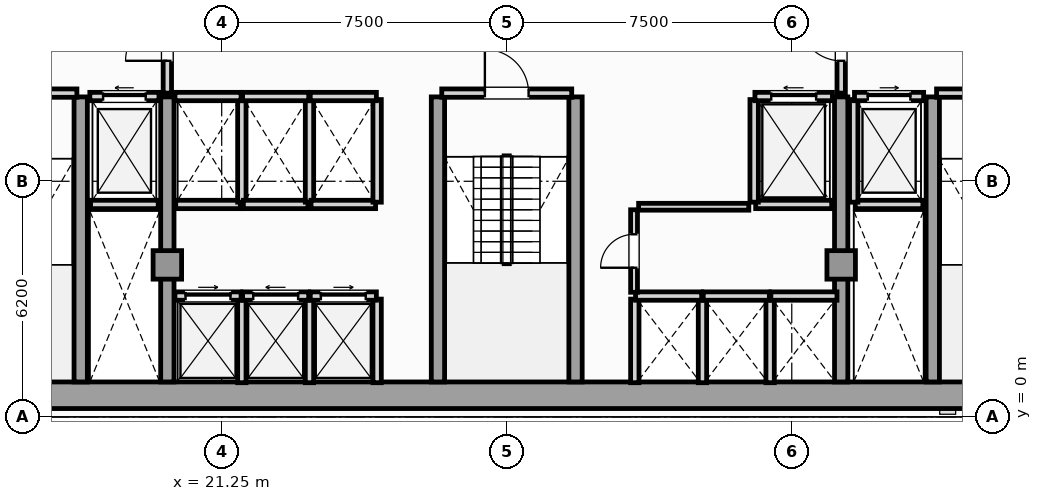
"""IFC4 building model, lengths in metres.
Left out: names, types, materials, properties, quantities, classifications, styles, units other than length and angle.
Written with IfcOpenShell. Run it as: python <this file> out.ifc"""

import sys

from ifc_helpers import new_model, si_unit, direction, frame, frame_2d, origin, origin_2d, place, context, subcontext, project, spatial, rectangle, extrude, element, fill, save


model = new_model("IFC4")
c1 = context("Model", 3, precision=1e-05, world=origin(), true_north=direction((0.0, 1.0)))
c2 = subcontext(c1, "Body", "Model", "MODEL_VIEW")
j1 = project(units=[si_unit("LENGTHUNIT", "METRE"), si_unit("PLANEANGLEUNIT", "RADIAN")], contexts=[c1])
p1 = place(None, origin())
s1 = spatial("IfcSite", under=j1, at=p1, CompositionType="ELEMENT")
p2 = place(p1, origin())
s2 = spatial("IfcBuilding", under=s1, at=p2, CompositionType="ELEMENT")
p3 = place(p2, frame((0.0, 0.0, 127.25)))
s3 = spatial("IfcBuildingStorey", under=s2, at=p3, CompositionType="ELEMENT", Elevation=127.25)
p4 = place(p3, frame((13.25, 0.57, 0.0), z_axis=(0.0, 0.0, 1.0), x_axis=(1.0, 0.0, 0.0)))
e1 = element("IfcWall", 1, at=p4, inside=s3, PredefinedType="SHEAR", context=c2, shape_type="SweptSolid", body=[
    extrude(rectangle(XDim=31.0, YDim=0.7, at=frame_2d((15.5, 0.0))), origin(), (0.0, 0.0, 1.0), 3.6),
])
for number, where, z_axis, x_axis in (
    (2, (17.54, 0.92, 0.0), (0.0, 0.0, 1.0), (0.0, 1.0, 0.0)),
    (3, (19.82, 0.92, 0.0), (0.0, 0.0, 1.0), (0.0, 1.0, 0.0)),
    (4, (26.94, 0.92, 0.0), (0.0, 0.0, 1.0), (0.0, 1.0, 0.0)),
    (5, (30.56, 0.92, 0.0), (0.0, 0.0, 1.0), (0.0, 1.0, 0.0)),
    (6, (37.55, 0.92, 0.0), (0.0, 0.0, 1.0), (0.0, 1.0, 0.0)),
    (7, (39.96, 0.92, 0.0), (0.0, 0.0, 1.0), (0.0, 1.0, 0.0)),
):
    element("IfcWall", number, at=place(p3, frame(where, z_axis=z_axis, x_axis=x_axis)), inside=s3, PredefinedType="SHEAR", context=c2, shape_type="SweptSolid", body=[
        extrude(rectangle(XDim=7.5, YDim=0.35, at=frame_2d((3.75, 0.0))), origin(), (0.0, 0.0, 1.0), 3.6),
    ])
for number, where, z_axis, x_axis in (
    (8, (19.82, 4.0, 0.0), (0.0, 0.0, 1.0), (1.0, 0.0, 0.0)),
    (9, (37.55, 4.0, 0.0), (0.0, 0.0, 1.0), (1.0, 0.0, 0.0)),
):
    element("IfcColumn", number, at=place(p3, frame(where, z_axis=z_axis, x_axis=x_axis)), inside=s3, PredefinedType="COLUMN", context=c2, shape_type="SweptSolid", body=[
        extrude(rectangle(XDim=0.75, YDim=0.75, at=origin_2d()), origin(), (0.0, 0.0, 1.0), 3.85),
    ])
p5 = place(p3, frame((17.8, 5.59, 0.0), z_axis=(0.0, 0.0, 1.0), x_axis=(1.0, 0.0, 0.0)))
e10 = element("IfcWall", 10, at=p5, inside=s3, PredefinedType="SOLIDWALL", context=c2, shape_type="SweptSolid", body=[
    extrude(rectangle(XDim=1.78, YDim=0.22, at=frame_2d((0.89, 0.0))), origin(), (0.0, 0.0, 1.0), 3.6),
])
p6 = place(p3, frame((17.78, 8.43, 0.0), z_axis=(0.0, 0.0, 1.0), x_axis=(1.0, 0.0, 0.0)))
e11 = element("IfcWall", 11, at=p6, inside=s3, PredefinedType="SOLIDWALL", context=c2, shape_type="SweptSolid", body=[
    extrude(rectangle(XDim=1.82, YDim=0.22, at=frame_2d((0.91, 0.0))), origin(), (0.0, 0.0, 1.0), 3.6),
])
p7 = place(p6, frame((0.35, 0.0, 0.0)))
e12 = element("IfcOpeningElement", 12, at=p7, cuts=e11, PredefinedType="OPENING", context=c2, shape_type="SweptSolid", body=[
    extrude(rectangle(XDim=1.12, YDim=2.25, at=frame_2d((0.56, 1.125))), frame((0.0, 0.12, 0.0), z_axis=(0.0, -1.0, 0.0), x_axis=(1.0, 0.0, 0.0)), (0.0, 0.0, 1.0), 0.24),
])
p8 = place(p3, frame((37.92, 5.59, 0.0), z_axis=(0.0, 0.0, 1.0), x_axis=(1.0, 0.0, 0.0)))
e13 = element("IfcWall", 13, at=p8, inside=s3, PredefinedType="SOLIDWALL", context=c2, shape_type="SweptSolid", body=[
    extrude(rectangle(XDim=1.78, YDim=0.22, at=frame_2d((0.89, 0.0))), origin(), (0.0, 0.0, 1.0), 3.6),
])
p9 = place(p3, frame((37.88, 5.65, 0.0), z_axis=(0.0, 0.0, 1.0), x_axis=(0.0, 1.0, 0.0)))
e14 = element("IfcWall", 14, at=p9, inside=s3, PredefinedType="SOLIDWALL", context=c2, shape_type="SweptSolid", body=[
    extrude(rectangle(XDim=2.7, YDim=0.22, at=frame_2d((1.35, 0.0))), origin(), (0.0, 0.0, 1.0), 3.6),
])
p10 = place(p3, frame((37.9, 8.43, 0.0), z_axis=(0.0, 0.0, 1.0), x_axis=(1.0, 0.0, 0.0)))
e15 = element("IfcWall", 15, at=p10, inside=s3, PredefinedType="SOLIDWALL", context=c2, shape_type="SweptSolid", body=[
    extrude(rectangle(XDim=1.82, YDim=0.22, at=frame_2d((0.91, 0.0))), origin(), (0.0, 0.0, 1.0), 3.6),
])
p11 = place(p10, frame((0.35, 0.0, 0.0)))
e16 = element("IfcOpeningElement", 16, at=p11, cuts=e15, PredefinedType="OPENING", context=c2, shape_type="SweptSolid", body=[
    extrude(rectangle(XDim=1.12, YDim=2.25, at=frame_2d((0.56, 1.125))), frame((0.0, 0.12, 0.0), z_axis=(0.0, -1.0, 0.0), x_axis=(1.0, 0.0, 0.0)), (0.0, 0.0, 1.0), 0.24),
])
p12 = place(p3, frame((35.3, 5.59, 0.0), z_axis=(0.0, 0.0, 1.0), x_axis=(1.0, 0.0, 0.0)))
e17 = element("IfcWall", 17, at=p12, inside=s3, PredefinedType="SOLIDWALL", context=c2, shape_type="SweptSolid", body=[
    extrude(rectangle(XDim=2.0, YDim=0.22, at=frame_2d((1.0, 0.0))), origin(), (0.0, 0.0, 1.0), 3.6),
])
p13 = place(p3, frame((35.26, 5.65, 0.0), z_axis=(0.0, 0.0, 1.0), x_axis=(0.0, 1.0, 0.0)))
e18 = element("IfcWall", 18, at=p13, inside=s3, PredefinedType="SOLIDWALL", context=c2, shape_type="SweptSolid", body=[
    extrude(rectangle(XDim=2.7, YDim=0.22, at=frame_2d((1.35, 0.0))), origin(), (0.0, 0.0, 1.0), 3.6),
])
p14 = place(p3, frame((35.28, 8.43, 0.0), z_axis=(0.0, 0.0, 1.0), x_axis=(1.0, 0.0, 0.0)))
e19 = element("IfcWall", 19, at=p14, inside=s3, PredefinedType="SOLIDWALL", context=c2, shape_type="SweptSolid", body=[
    extrude(rectangle(XDim=2.04, YDim=0.22, at=frame_2d((1.02, 0.0))), origin(), (0.0, 0.0, 1.0), 3.6),
])
p15 = place(p14, frame((0.43, 0.0, 0.0)))
e20 = element("IfcOpeningElement", 20, at=p15, cuts=e19, PredefinedType="OPENING", context=c2, shape_type="SweptSolid", body=[
    extrude(rectangle(XDim=1.18, YDim=2.2, at=frame_2d((0.59, 1.1))), frame((0.0, 0.12, 0.0), z_axis=(0.0, -1.0, 0.0), x_axis=(1.0, 0.0, 0.0)), (0.0, 0.0, 1.0), 0.24),
])
p16 = place(p3, frame((21.78, 0.9, 0.0), z_axis=(0.0, 0.0, 1.0), x_axis=(0.0, 1.0, 0.0)))
e21 = element("IfcWall", 21, at=p16, inside=s3, PredefinedType="SOLIDWALL", context=c2, shape_type="SweptSolid", body=[
    extrude(rectangle(XDim=2.2, YDim=0.22, at=frame_2d((1.1, 0.0))), origin(), (0.0, 0.0, 1.0), 3.6),
])
p17 = place(p3, frame((20.02, 3.18, 0.0), z_axis=(0.0, 0.0, 1.0), x_axis=(1.0, 0.0, 0.0)))
e22 = element("IfcWall", 22, at=p17, inside=s3, PredefinedType="SOLIDWALL", context=c2, shape_type="SweptSolid", body=[
    extrude(rectangle(XDim=1.74, YDim=0.22, at=frame_2d((0.87, 0.0))), origin(), (0.0, 0.0, 1.0), 3.6),
])
p18 = place(p17, frame((0.28, 0.0, 0.0)))
e23 = element("IfcOpeningElement", 23, at=p18, cuts=e22, PredefinedType="OPENING", context=c2, shape_type="SweptSolid", body=[
    extrude(rectangle(XDim=1.18, YDim=2.2, at=frame_2d((0.59, 1.1))), frame((0.0, 0.12, 0.0), z_axis=(0.0, -1.0, 0.0), x_axis=(1.0, 0.0, 0.0)), (0.0, 0.0, 1.0), 0.24),
])
p19 = place(p3, frame((23.56, 0.9, 0.0), z_axis=(0.0, 0.0, 1.0), x_axis=(0.0, 1.0, 0.0)))
e24 = element("IfcWall", 24, at=p19, inside=s3, PredefinedType="SOLIDWALL", context=c2, shape_type="SweptSolid", body=[
    extrude(rectangle(XDim=2.2, YDim=0.22, at=frame_2d((1.1, 0.0))), origin(), (0.0, 0.0, 1.0), 3.6),
])
p20 = place(p3, frame((21.8, 3.18, 0.0), z_axis=(0.0, 0.0, 1.0), x_axis=(1.0, 0.0, 0.0)))
e25 = element("IfcWall", 25, at=p20, inside=s3, PredefinedType="SOLIDWALL", context=c2, shape_type="SweptSolid", body=[
    extrude(rectangle(XDim=1.74, YDim=0.22, at=frame_2d((0.87, 0.0))), origin(), (0.0, 0.0, 1.0), 3.6),
])
p21 = place(p20, frame((0.28, 0.0, 0.0)))
e26 = element("IfcOpeningElement", 26, at=p21, cuts=e25, PredefinedType="OPENING", context=c2, shape_type="SweptSolid", body=[
    extrude(rectangle(XDim=1.18, YDim=2.2, at=frame_2d((0.59, 1.1))), frame((0.0, 0.12, 0.0), z_axis=(0.0, -1.0, 0.0), x_axis=(1.0, 0.0, 0.0)), (0.0, 0.0, 1.0), 0.24),
])
p22 = place(p3, frame((25.34, 0.9, 0.0), z_axis=(0.0, 0.0, 1.0), x_axis=(0.0, 1.0, 0.0)))
e27 = element("IfcWall", 27, at=p22, inside=s3, PredefinedType="SOLIDWALL", context=c2, shape_type="SweptSolid", body=[
    extrude(rectangle(XDim=2.2, YDim=0.22, at=frame_2d((1.1, 0.0))), origin(), (0.0, 0.0, 1.0), 3.6),
])
p23 = place(p3, frame((23.58, 3.18, 0.0), z_axis=(0.0, 0.0, 1.0), x_axis=(1.0, 0.0, 0.0)))
e28 = element("IfcWall", 28, at=p23, inside=s3, PredefinedType="SOLIDWALL", context=c2, shape_type="SweptSolid", body=[
    extrude(rectangle(XDim=1.74, YDim=0.22, at=frame_2d((0.87, 0.0))), origin(), (0.0, 0.0, 1.0), 3.6),
])
p24 = place(p23, frame((0.28, 0.0, 0.0)))
e29 = element("IfcOpeningElement", 29, at=p24, cuts=e28, PredefinedType="OPENING", context=c2, shape_type="SweptSolid", body=[
    extrude(rectangle(XDim=1.18, YDim=2.2, at=frame_2d((0.59, 1.1))), frame((0.0, 0.12, 0.0), z_axis=(0.0, -1.0, 0.0), x_axis=(1.0, 0.0, 0.0)), (0.0, 0.0, 1.0), 0.24),
])
for number, where, z_axis, x_axis in (
    (30, (32.12, 0.9, 0.0), (0.0, 0.0, 1.0), (0.0, 1.0, 0.0)),
    (31, (33.9, 0.9, 0.0), (0.0, 0.0, 1.0), (0.0, 1.0, 0.0)),
):
    element("IfcWall", number, at=place(p3, frame(where, z_axis=z_axis, x_axis=x_axis)), inside=s3, PredefinedType="SOLIDWALL", context=c2, shape_type="SweptSolid", body=[
        extrude(rectangle(XDim=2.2, YDim=0.22, at=frame_2d((1.1, 0.0))), origin(), (0.0, 0.0, 1.0), 3.6),
    ])
p25 = place(p3, frame((32.14, 3.18, 0.0), z_axis=(0.0, 0.0, 1.0), x_axis=(1.0, 0.0, 0.0)))
e32 = element("IfcWall", 32, at=p25, inside=s3, PredefinedType="SOLIDWALL", context=c2, shape_type="SweptSolid", body=[
    extrude(rectangle(XDim=1.74, YDim=0.22, at=frame_2d((0.87, 0.0))), origin(), (0.0, 0.0, 1.0), 3.6),
])
p26 = place(p3, frame((35.68, 0.9, 0.0), z_axis=(0.0, 0.0, 1.0), x_axis=(0.0, 1.0, 0.0)))
e33 = element("IfcWall", 33, at=p26, inside=s3, PredefinedType="SOLIDWALL", context=c2, shape_type="SweptSolid", body=[
    extrude(rectangle(XDim=2.2, YDim=0.22, at=frame_2d((1.1, 0.0))), origin(), (0.0, 0.0, 1.0), 3.6),
])
for number, where, z_axis, x_axis in (
    (34, (33.92, 3.18, 0.0), (0.0, 0.0, 1.0), (1.0, 0.0, 0.0)),
    (35, (35.7, 3.18, 0.0), (0.0, 0.0, 1.0), (1.0, 0.0, 0.0)),
):
    element("IfcWall", number, at=place(p3, frame(where, z_axis=z_axis, x_axis=x_axis)), inside=s3, PredefinedType="SOLIDWALL", context=c2, shape_type="SweptSolid", body=[
        extrude(rectangle(XDim=1.74, YDim=0.22, at=frame_2d((0.87, 0.0))), origin(), (0.0, 0.0, 1.0), 3.6),
    ])
p27 = place(p3, frame((20.04, 5.59, 0.0), z_axis=(0.0, 0.0, 1.0), x_axis=(1.0, 0.0, 0.0)))
e36 = element("IfcWall", 36, at=p27, inside=s3, PredefinedType="SOLIDWALL", context=c2, shape_type="SweptSolid", body=[
    extrude(rectangle(XDim=1.7, YDim=0.22, at=frame_2d((0.85, 0.0))), origin(), (0.0, 0.0, 1.0), 3.6),
])
p28 = place(p3, frame((21.78, 5.65, 0.0), z_axis=(0.0, 0.0, 1.0), x_axis=(0.0, 1.0, 0.0)))
e37 = element("IfcWall", 37, at=p28, inside=s3, PredefinedType="SOLIDWALL", context=c2, shape_type="SweptSolid", body=[
    extrude(rectangle(XDim=2.7, YDim=0.22, at=frame_2d((1.35, 0.0))), origin(), (0.0, 0.0, 1.0), 3.6),
])
p29 = place(p3, frame((20.02, 8.43, 0.0), z_axis=(0.0, 0.0, 1.0), x_axis=(1.0, 0.0, 0.0)))
e38 = element("IfcWall", 38, at=p29, inside=s3, PredefinedType="SOLIDWALL", context=c2, shape_type="SweptSolid", body=[
    extrude(rectangle(XDim=1.74, YDim=0.22, at=frame_2d((0.87, 0.0))), origin(), (0.0, 0.0, 1.0), 3.6),
])
p30 = place(p3, frame((21.82, 5.59, 0.0), z_axis=(0.0, 0.0, 1.0), x_axis=(1.0, 0.0, 0.0)))
e39 = element("IfcWall", 39, at=p30, inside=s3, PredefinedType="SOLIDWALL", context=c2, shape_type="SweptSolid", body=[
    extrude(rectangle(XDim=1.7, YDim=0.22, at=frame_2d((0.85, 0.0))), origin(), (0.0, 0.0, 1.0), 3.6),
])
p31 = place(p3, frame((23.56, 5.65, 0.0), z_axis=(0.0, 0.0, 1.0), x_axis=(0.0, 1.0, 0.0)))
e40 = element("IfcWall", 40, at=p31, inside=s3, PredefinedType="SOLIDWALL", context=c2, shape_type="SweptSolid", body=[
    extrude(rectangle(XDim=2.7, YDim=0.22, at=frame_2d((1.35, 0.0))), origin(), (0.0, 0.0, 1.0), 3.6),
])
p32 = place(p3, frame((21.8, 8.43, 0.0), z_axis=(0.0, 0.0, 1.0), x_axis=(1.0, 0.0, 0.0)))
e41 = element("IfcWall", 41, at=p32, inside=s3, PredefinedType="SOLIDWALL", context=c2, shape_type="SweptSolid", body=[
    extrude(rectangle(XDim=1.74, YDim=0.22, at=frame_2d((0.87, 0.0))), origin(), (0.0, 0.0, 1.0), 3.6),
])
p33 = place(p3, frame((23.6, 5.59, 0.0), z_axis=(0.0, 0.0, 1.0), x_axis=(1.0, 0.0, 0.0)))
e42 = element("IfcWall", 42, at=p33, inside=s3, PredefinedType="SOLIDWALL", context=c2, shape_type="SweptSolid", body=[
    extrude(rectangle(XDim=1.7, YDim=0.22, at=frame_2d((0.85, 0.0))), origin(), (0.0, 0.0, 1.0), 3.6),
])
p34 = place(p3, frame((25.34, 5.65, 0.0), z_axis=(0.0, 0.0, 1.0), x_axis=(0.0, 1.0, 0.0)))
e43 = element("IfcWall", 43, at=p34, inside=s3, PredefinedType="SOLIDWALL", context=c2, shape_type="SweptSolid", body=[
    extrude(rectangle(XDim=2.7, YDim=0.22, at=frame_2d((1.35, 0.0))), origin(), (0.0, 0.0, 1.0), 3.6),
])
p35 = place(p3, frame((23.58, 8.43, 0.0), z_axis=(0.0, 0.0, 1.0), x_axis=(1.0, 0.0, 0.0)))
e44 = element("IfcWall", 44, at=p35, inside=s3, PredefinedType="SOLIDWALL", context=c2, shape_type="SweptSolid", body=[
    extrude(rectangle(XDim=1.74, YDim=0.22, at=frame_2d((0.87, 0.0))), origin(), (0.0, 0.0, 1.0), 3.6),
])
p36 = place(p3, frame((14.04, 8.52, 0.0), z_axis=(0.0, 0.0, 1.0), x_axis=(1.0, 0.0, 0.0)))
e45 = element("IfcWall", 45, at=p36, inside=s3, PredefinedType="SOLIDWALL", context=c2, shape_type="SweptSolid", body=[
    extrude(rectangle(XDim=3.4, YDim=0.22, at=frame_2d((1.7, 0.0))), origin(), (0.0, 0.0, 1.0), 3.6),
])
p37 = place(p36, frame((1.125, 0.0, 0.0)))
e46 = element("IfcOpeningElement", 46, at=p37, cuts=e45, PredefinedType="OPENING", context=c2, shape_type="SweptSolid", body=[
    extrude(rectangle(XDim=1.15, YDim=2.2, at=frame_2d((0.575, 1.1))), frame((0.0, 0.12, 0.0), z_axis=(0.0, -1.0, 0.0), x_axis=(1.0, 0.0, 0.0)), (0.0, 0.0, 1.0), 0.24),
])
p38 = place(p3, frame((40.06, 8.52, 0.0), z_axis=(0.0, 0.0, 1.0), x_axis=(1.0, 0.0, 0.0)))
e47 = element("IfcWall", 47, at=p38, inside=s3, PredefinedType="SOLIDWALL", context=c2, shape_type="SweptSolid", body=[
    extrude(rectangle(XDim=3.4, YDim=0.22, at=frame_2d((1.7, 0.0))), origin(), (0.0, 0.0, 1.0), 3.6),
])
p39 = place(p38, frame((1.125, 0.0, 0.0)))
e48 = element("IfcOpeningElement", 48, at=p39, cuts=e47, PredefinedType="OPENING", context=c2, shape_type="SweptSolid", body=[
    extrude(rectangle(XDim=1.15, YDim=2.2, at=frame_2d((0.575, 1.1))), frame((0.0, 0.12, 0.0), z_axis=(0.0, -1.0, 0.0), x_axis=(1.0, 0.0, 0.0)), (0.0, 0.0, 1.0), 0.24),
])
p40 = place(p3, frame((27.04, 8.52, 0.0), z_axis=(0.0, 0.0, 1.0), x_axis=(1.0, 0.0, 0.0)))
e49 = element("IfcWall", 49, at=p40, inside=s3, PredefinedType="SOLIDWALL", context=c2, shape_type="SweptSolid", body=[
    extrude(rectangle(XDim=3.42, YDim=0.22, at=frame_2d((1.71, 0.0))), origin(), (0.0, 0.0, 1.0), 3.6),
])
p41 = place(p40, frame((1.135, 0.0, 0.0)))
e50 = element("IfcOpeningElement", 50, at=p41, cuts=e49, PredefinedType="OPENING", context=c2, shape_type="SweptSolid", body=[
    extrude(rectangle(XDim=1.15, YDim=2.2, at=frame_2d((0.575, 1.1))), frame((0.0, 0.12, 0.0), z_axis=(0.0, -1.0, 0.0), x_axis=(1.0, 0.0, 0.0)), (0.0, 0.0, 1.0), 0.24),
])
p42 = place(p3, frame((19.82, 8.52, 0.0), z_axis=(0.0, 0.0, 1.0), x_axis=(0.0, 1.0, 0.0)))
e51 = element("IfcWall", 51, at=p42, inside=s3, PredefinedType="SOLIDWALL", context=c2, shape_type="SweptSolid", body=[
    extrude(rectangle(XDim=2.8, YDim=0.22, at=frame_2d((1.4, 0.0))), origin(), (0.0, 0.0, 1.0), 3.055),
])
p43 = place(p42, frame((0.85, 0.0, 0.0)))
e52 = element("IfcOpeningElement", 52, at=p43, cuts=e51, PredefinedType="OPENING", context=c2, shape_type="SweptSolid", body=[
    extrude(rectangle(XDim=1.1, YDim=2.2, at=frame_2d((0.55, 1.1))), frame((0.0, 0.12, 0.0), z_axis=(0.0, -1.0, 0.0), x_axis=(1.0, 0.0, 0.0)), (0.0, 0.0, 1.0), 0.24),
])
p44 = place(p3, frame((37.55, 8.52, 0.0), z_axis=(0.0, 0.0, 1.0), x_axis=(0.0, 1.0, 0.0)))
e53 = element("IfcWall", 53, at=p44, inside=s3, PredefinedType="SOLIDWALL", context=c2, shape_type="SweptSolid", body=[
    extrude(rectangle(XDim=2.8, YDim=0.22, at=frame_2d((1.4, 0.0))), origin(), (0.0, 0.0, 1.0), 3.055),
])
p45 = place(p44, frame((0.85, 0.0, 0.0)))
e54 = element("IfcOpeningElement", 54, at=p45, cuts=e53, PredefinedType="OPENING", context=c2, shape_type="SweptSolid", body=[
    extrude(rectangle(XDim=1.1, YDim=2.2, at=frame_2d((0.55, 1.1))), frame((0.0, 0.12, 0.0), z_axis=(0.0, -1.0, 0.0), x_axis=(1.0, 0.0, 0.0)), (0.0, 0.0, 1.0), 0.24),
])
p46 = place(p3, frame((32.1, 3.28, 0.0), z_axis=(0.0, 0.0, 1.0), x_axis=(0.0, 1.0, 0.0)))
e55 = element("IfcWall", 55, at=p46, inside=s3, PredefinedType="PARTITIONING", context=c2, shape_type="SweptSolid", body=[
    extrude(rectangle(XDim=2.17, YDim=0.18, at=frame_2d((1.085, 0.0))), origin(), (0.0, 0.0, 1.0), 3.6),
])
p47 = place(p46, frame((0.645, 0.0, 0.0)))
e56 = element("IfcOpeningElement", 56, at=p47, cuts=e55, PredefinedType="OPENING", context=c2, shape_type="SweptSolid", body=[
    extrude(rectangle(XDim=0.88, YDim=2.05, at=frame_2d((0.44, 1.025))), frame((0.0, 0.1, 0.0), z_axis=(0.0, -1.0, 0.0), x_axis=(1.0, 0.0, 0.0)), (0.0, 0.0, 1.0), 0.2),
])
p48 = place(p3, frame((32.22, 5.53, 0.0), z_axis=(0.0, 0.0, 1.0), x_axis=(1.0, 0.0, 0.0)))
e57 = element("IfcWall", 57, at=p48, inside=s3, PredefinedType="PARTITIONING", context=c2, shape_type="SweptSolid", body=[
    extrude(rectangle(XDim=2.9, YDim=0.18, at=frame_2d((1.45, 0.0))), origin(), (0.0, 0.0, 1.0), 3.6),
])
p49 = place(p7, origin())
e58 = element("IfcDoor", 58, at=p49, inside=s3, OperationType="SLIDING_TO_LEFT", PredefinedType="DOOR", context=c2, shape_type="SweptSolid", body=[
    extrude(rectangle(XDim=1.12, YDim=2.25, at=frame_2d((0.56, 1.125))), frame((0.0, 0.025, 0.0), z_axis=(0.0, -1.0, 0.0), x_axis=(1.0, 0.0, 0.0)), (0.0, 0.0, 1.0), 0.05),
])
fill(e12, e58)
p50 = place(p11, origin())
e59 = element("IfcDoor", 59, at=p50, inside=s3, OperationType="SLIDING_TO_RIGHT", PredefinedType="DOOR", context=c2, shape_type="SweptSolid", body=[
    extrude(rectangle(XDim=1.12, YDim=2.25, at=frame_2d((0.56, 1.125))), frame((0.0, 0.025, 0.0), z_axis=(0.0, -1.0, 0.0), x_axis=(1.0, 0.0, 0.0)), (0.0, 0.0, 1.0), 0.05),
])
fill(e16, e59)
p51 = place(p15, origin())
e60 = element("IfcDoor", 60, at=p51, inside=s3, OperationType="SLIDING_TO_LEFT", PredefinedType="DOOR", context=c2, shape_type="SweptSolid", body=[
    extrude(rectangle(XDim=1.18, YDim=2.2, at=frame_2d((0.59, 1.1))), frame((0.0, 0.025, 0.0), z_axis=(0.0, -1.0, 0.0), x_axis=(1.0, 0.0, 0.0)), (0.0, 0.0, 1.0), 0.05),
])
fill(e20, e60)
p52 = place(p18, origin())
e61 = element("IfcDoor", 61, at=p52, inside=s3, OperationType="SLIDING_TO_RIGHT", PredefinedType="DOOR", context=c2, shape_type="SweptSolid", body=[
    extrude(rectangle(XDim=1.18, YDim=2.2, at=frame_2d((0.59, 1.1))), frame((0.0, 0.025, 0.0), z_axis=(0.0, -1.0, 0.0), x_axis=(1.0, 0.0, 0.0)), (0.0, 0.0, 1.0), 0.05),
])
fill(e23, e61)
p53 = place(p21, origin())
e62 = element("IfcDoor", 62, at=p53, inside=s3, OperationType="SLIDING_TO_LEFT", PredefinedType="DOOR", context=c2, shape_type="SweptSolid", body=[
    extrude(rectangle(XDim=1.18, YDim=2.2, at=frame_2d((0.59, 1.1))), frame((0.0, 0.025, 0.0), z_axis=(0.0, -1.0, 0.0), x_axis=(1.0, 0.0, 0.0)), (0.0, 0.0, 1.0), 0.05),
])
fill(e26, e62)
p54 = place(p24, origin())
e63 = element("IfcDoor", 63, at=p54, inside=s3, OperationType="SLIDING_TO_RIGHT", PredefinedType="DOOR", context=c2, shape_type="SweptSolid", body=[
    extrude(rectangle(XDim=1.18, YDim=2.2, at=frame_2d((0.59, 1.1))), frame((0.0, 0.025, 0.0), z_axis=(0.0, -1.0, 0.0), x_axis=(1.0, 0.0, 0.0)), (0.0, 0.0, 1.0), 0.05),
])
fill(e29, e63)
p55 = place(p41, origin())
e64 = element("IfcDoor", 64, at=p55, inside=s3, OperationType="SINGLE_SWING_LEFT", PredefinedType="DOOR", context=c2, shape_type="SweptSolid", body=[
    extrude(rectangle(XDim=1.15, YDim=2.2, at=frame_2d((0.575, 1.1))), frame((0.0, 0.025, 0.0), z_axis=(0.0, -1.0, 0.0), x_axis=(1.0, 0.0, 0.0)), (0.0, 0.0, 1.0), 0.05),
])
fill(e50, e64)
p56 = place(p43, origin())
e65 = element("IfcDoor", 65, at=p56, inside=s3, OperationType="SINGLE_SWING_LEFT", PredefinedType="DOOR", context=c2, shape_type="SweptSolid", body=[
    extrude(rectangle(XDim=1.1, YDim=2.2, at=frame_2d((0.55, 1.1))), frame((0.0, 0.025, 0.0), z_axis=(0.0, -1.0, 0.0), x_axis=(1.0, 0.0, 0.0)), (0.0, 0.0, 1.0), 0.05),
])
fill(e52, e65)
p57 = place(p45, origin())
e66 = element("IfcDoor", 66, at=p57, inside=s3, OperationType="SINGLE_SWING_RIGHT", PredefinedType="DOOR", context=c2, shape_type="SweptSolid", body=[
    extrude(rectangle(XDim=1.1, YDim=2.2, at=frame_2d((0.55, 1.1))), frame((0.0, 0.025, 0.0), z_axis=(0.0, -1.0, 0.0), x_axis=(1.0, 0.0, 0.0)), (0.0, 0.0, 1.0), 0.05),
])
fill(e54, e66)
p58 = place(p47, origin())
e67 = element("IfcDoor", 67, at=p58, inside=s3, OperationType="SINGLE_SWING_LEFT", PredefinedType="DOOR", context=c2, shape_type="SweptSolid", body=[
    extrude(rectangle(XDim=0.88, YDim=2.05, at=frame_2d((0.44, 1.025))), frame((0.0, 0.025, 0.0), z_axis=(0.0, -1.0, 0.0), x_axis=(1.0, 0.0, 0.0)), (0.0, 0.0, 1.0), 0.05),
])
fill(e56, e67)
save(model, sys.argv[1])
